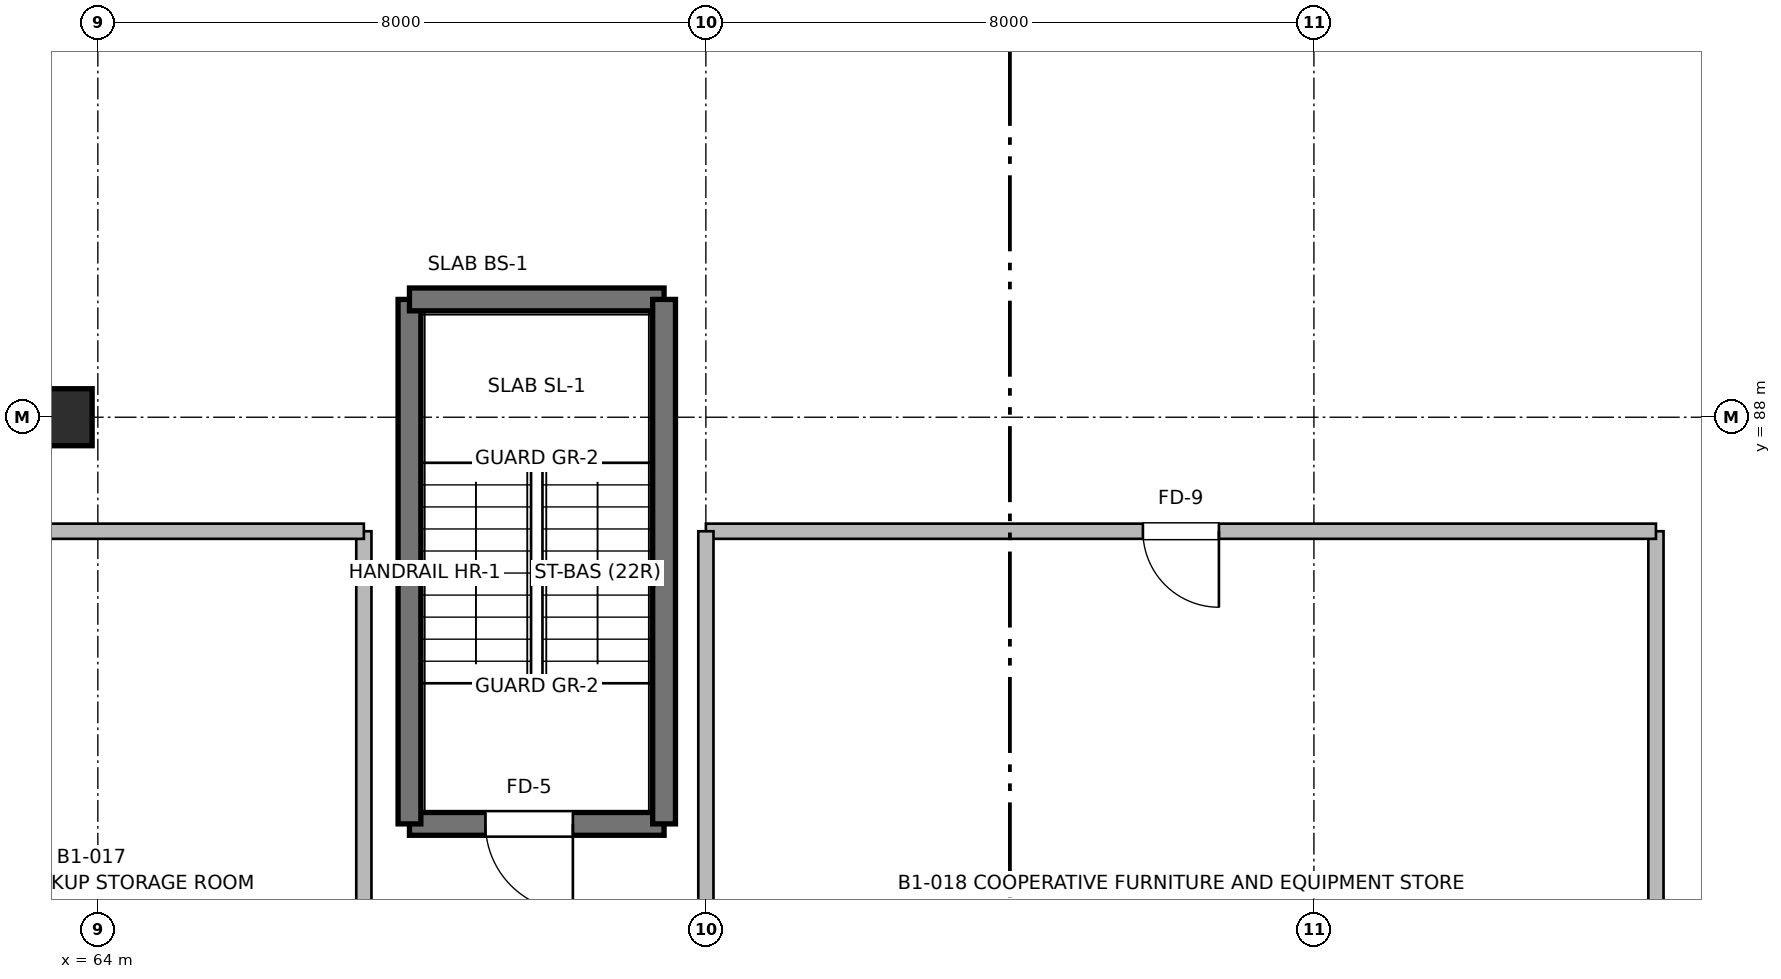
"""IFC4 building model, lengths in metres.
Left out: names, types, materials, properties, quantities, classifications, styles, units other than length and angle.
Written with IfcOpenShell. Run it as: python <this file> out.ifc"""

import sys

from ifc_helpers import new_model, si_unit, direction, frame, frame_2d, origin, origin_2d, place, context, subcontext, project, spatial, rectangle, extrude, element, fill, save


model = new_model("IFC4")
c1 = context("Model", 3, precision=1e-05, world=origin(), true_north=direction((0.0, 1.0)))
c2 = subcontext(c1, "Body", "Model", "MODEL_VIEW")
j1 = project(units=[si_unit("LENGTHUNIT", "METRE"), si_unit("PLANEANGLEUNIT", "RADIAN")], contexts=[c1])
p1 = place(None, origin())
s1 = spatial("IfcSite", under=j1, at=p1, CompositionType="ELEMENT")
p2 = place(p1, origin())
s2 = spatial("IfcBuilding", under=s1, at=p2, CompositionType="ELEMENT")
p3 = place(p2, frame((0.0, 0.0, -3.84)))
s3 = spatial("IfcBuildingStorey", under=s2, at=p3, CompositionType="ELEMENT", Elevation=-3.84)
p4 = place(p3, frame((63.55, 88.0, 0.0), z_axis=(0.0, 0.0, 1.0), x_axis=(1.0, 0.0, 0.0)))
e1 = element("IfcColumn", 1, at=p4, inside=s3, PredefinedType="COLUMN", context=c2, shape_type="SweptSolid", body=[
    extrude(rectangle(XDim=0.75, YDim=0.75, at=origin_2d()), origin(), (0.0, 0.0, 1.0), 3.84),
])
p5 = place(p3, frame((71.45, 82.65, 0.0), z_axis=(0.0, 0.0, 1.0), x_axis=(-1.0, 0.0, 0.0)))
e2 = element("IfcWall", 2, at=p5, inside=s3, PredefinedType="SHEAR", context=c2, shape_type="SweptSolid", body=[
    extrude(rectangle(XDim=3.35, YDim=0.3, at=frame_2d((1.675, 0.0))), origin(), (0.0, 0.0, 1.0), 3.52),
])
p6 = place(p5, frame((1.2, 0.0, 0.0)))
e3 = element("IfcOpeningElement", 3, at=p6, cuts=e2, PredefinedType="OPENING", context=c2, shape_type="SweptSolid", body=[
    extrude(rectangle(XDim=1.15, YDim=2.2, at=frame_2d((0.575, 1.1))), frame((0.0, 0.16, 0.0), z_axis=(0.0, -1.0, 0.0), x_axis=(1.0, 0.0, 0.0)), (0.0, 0.0, 1.0), 0.32),
])
p7 = place(p3, frame((68.1, 82.65, 0.0), z_axis=(0.0, 0.0, 1.0), x_axis=(0.0, 1.0, 0.0)))
e4 = element("IfcWall", 4, at=p7, inside=s3, PredefinedType="SHEAR", context=c2, shape_type="SweptSolid", body=[
    extrude(rectangle(XDim=6.9, YDim=0.3, at=frame_2d((3.45, 0.0))), origin(), (0.0, 0.0, 1.0), 3.52),
])
p8 = place(p3, frame((68.1, 89.55, 0.0), z_axis=(0.0, 0.0, 1.0), x_axis=(1.0, 0.0, 0.0)))
e5 = element("IfcWall", 5, at=p8, inside=s3, PredefinedType="SHEAR", context=c2, shape_type="SweptSolid", body=[
    extrude(rectangle(XDim=3.35, YDim=0.3, at=frame_2d((1.675, 0.0))), origin(), (0.0, 0.0, 1.0), 3.52),
])
p9 = place(p3, frame((71.45, 89.55, 0.0), z_axis=(0.0, 0.0, 1.0), x_axis=(0.0, -1.0, 0.0)))
e6 = element("IfcWall", 6, at=p9, inside=s3, PredefinedType="SHEAR", context=c2, shape_type="SweptSolid", body=[
    extrude(rectangle(XDim=6.9, YDim=0.3, at=frame_2d((3.45, 0.0))), origin(), (0.0, 0.0, 1.0), 3.52),
])
p10 = place(p3, frame((67.5, 77.2, 0.0), z_axis=(0.0, 0.0, 1.0), x_axis=(0.0, 1.0, 0.0)))
e7 = element("IfcWall", 7, at=p10, inside=s3, PredefinedType="SOLIDWALL", context=c2, shape_type="SweptSolid", body=[
    extrude(rectangle(XDim=9.3, YDim=0.2, at=frame_2d((4.65, 0.0))), origin(), (0.0, 0.0, 1.0), 3.52),
])
p11 = place(p3, frame((67.5, 86.5, 0.0), z_axis=(0.0, 0.0, 1.0), x_axis=(-1.0, 0.0, 0.0)))
e8 = element("IfcWall", 8, at=p11, inside=s3, PredefinedType="SOLIDWALL", context=c2, shape_type="SweptSolid", body=[
    extrude(rectangle(XDim=12.2, YDim=0.2, at=frame_2d((6.1, 0.0))), origin(), (0.0, 0.0, 1.0), 3.52),
])
p12 = place(p11, frame((5.6, 0.0, 0.0)))
e9 = element("IfcOpeningElement", 9, at=p12, cuts=e8, PredefinedType="OPENING", context=c2, shape_type="SweptSolid", body=[
    extrude(rectangle(XDim=1.0, YDim=2.1, at=frame_2d((0.5, 1.05))), frame((0.0, 0.11, 0.0), z_axis=(0.0, -1.0, 0.0), x_axis=(1.0, 0.0, 0.0)), (0.0, 0.0, 1.0), 0.22),
])
p13 = place(p3, frame((84.5, 77.2, 0.0), z_axis=(0.0, 0.0, 1.0), x_axis=(0.0, 1.0, 0.0)))
e10 = element("IfcWall", 10, at=p13, inside=s3, PredefinedType="SOLIDWALL", context=c2, shape_type="SweptSolid", body=[
    extrude(rectangle(XDim=9.3, YDim=0.2, at=frame_2d((4.65, 0.0))), origin(), (0.0, 0.0, 1.0), 3.52),
])
p14 = place(p3, frame((84.5, 86.5, 0.0), z_axis=(0.0, 0.0, 1.0), x_axis=(-1.0, 0.0, 0.0)))
e11 = element("IfcWall", 11, at=p14, inside=s3, PredefinedType="SOLIDWALL", context=c2, shape_type="SweptSolid", body=[
    extrude(rectangle(XDim=12.5, YDim=0.2, at=frame_2d((6.25, 0.0))), origin(), (0.0, 0.0, 1.0), 3.52),
])
p15 = place(p14, frame((5.75, 0.0, 0.0)))
e12 = element("IfcOpeningElement", 12, at=p15, cuts=e11, PredefinedType="OPENING", context=c2, shape_type="SweptSolid", body=[
    extrude(rectangle(XDim=1.0, YDim=2.1, at=frame_2d((0.5, 1.05))), frame((0.0, 0.11, 0.0), z_axis=(0.0, -1.0, 0.0), x_axis=(1.0, 0.0, 0.0)), (0.0, 0.0, 1.0), 0.22),
])
p16 = place(p3, frame((72.0, 86.5, 0.0), z_axis=(0.0, 0.0, 1.0), x_axis=(0.0, -1.0, 0.0)))
e13 = element("IfcWall", 13, at=p16, inside=s3, PredefinedType="SOLIDWALL", context=c2, shape_type="SweptSolid", body=[
    extrude(rectangle(XDim=9.3, YDim=0.2, at=frame_2d((4.65, 0.0))), origin(), (0.0, 0.0, 1.0), 3.52),
])
p17 = place(p6, origin())
e14 = element("IfcDoor", 14, at=p17, inside=s3, OperationType="SINGLE_SWING_LEFT", PredefinedType="DOOR", context=c2, shape_type="SweptSolid", body=[
    extrude(rectangle(XDim=1.15, YDim=2.2, at=frame_2d((0.575, 1.1))), frame((0.0, 0.025, 0.0), z_axis=(0.0, -1.0, 0.0), x_axis=(1.0, 0.0, 0.0)), (0.0, 0.0, 1.0), 0.05),
])
fill(e3, e14)
p18 = place(p15, origin())
e15 = element("IfcDoor", 15, at=p18, inside=s3, OperationType="SINGLE_SWING_LEFT", PredefinedType="DOOR", context=c2, shape_type="SweptSolid", body=[
    extrude(rectangle(XDim=1.0, YDim=2.1, at=frame_2d((0.5, 1.05))), frame((0.0, 0.025, 0.0), z_axis=(0.0, -1.0, 0.0), x_axis=(1.0, 0.0, 0.0)), (0.0, 0.0, 1.0), 0.05),
])
fill(e12, e15)
save(model, sys.argv[1])
